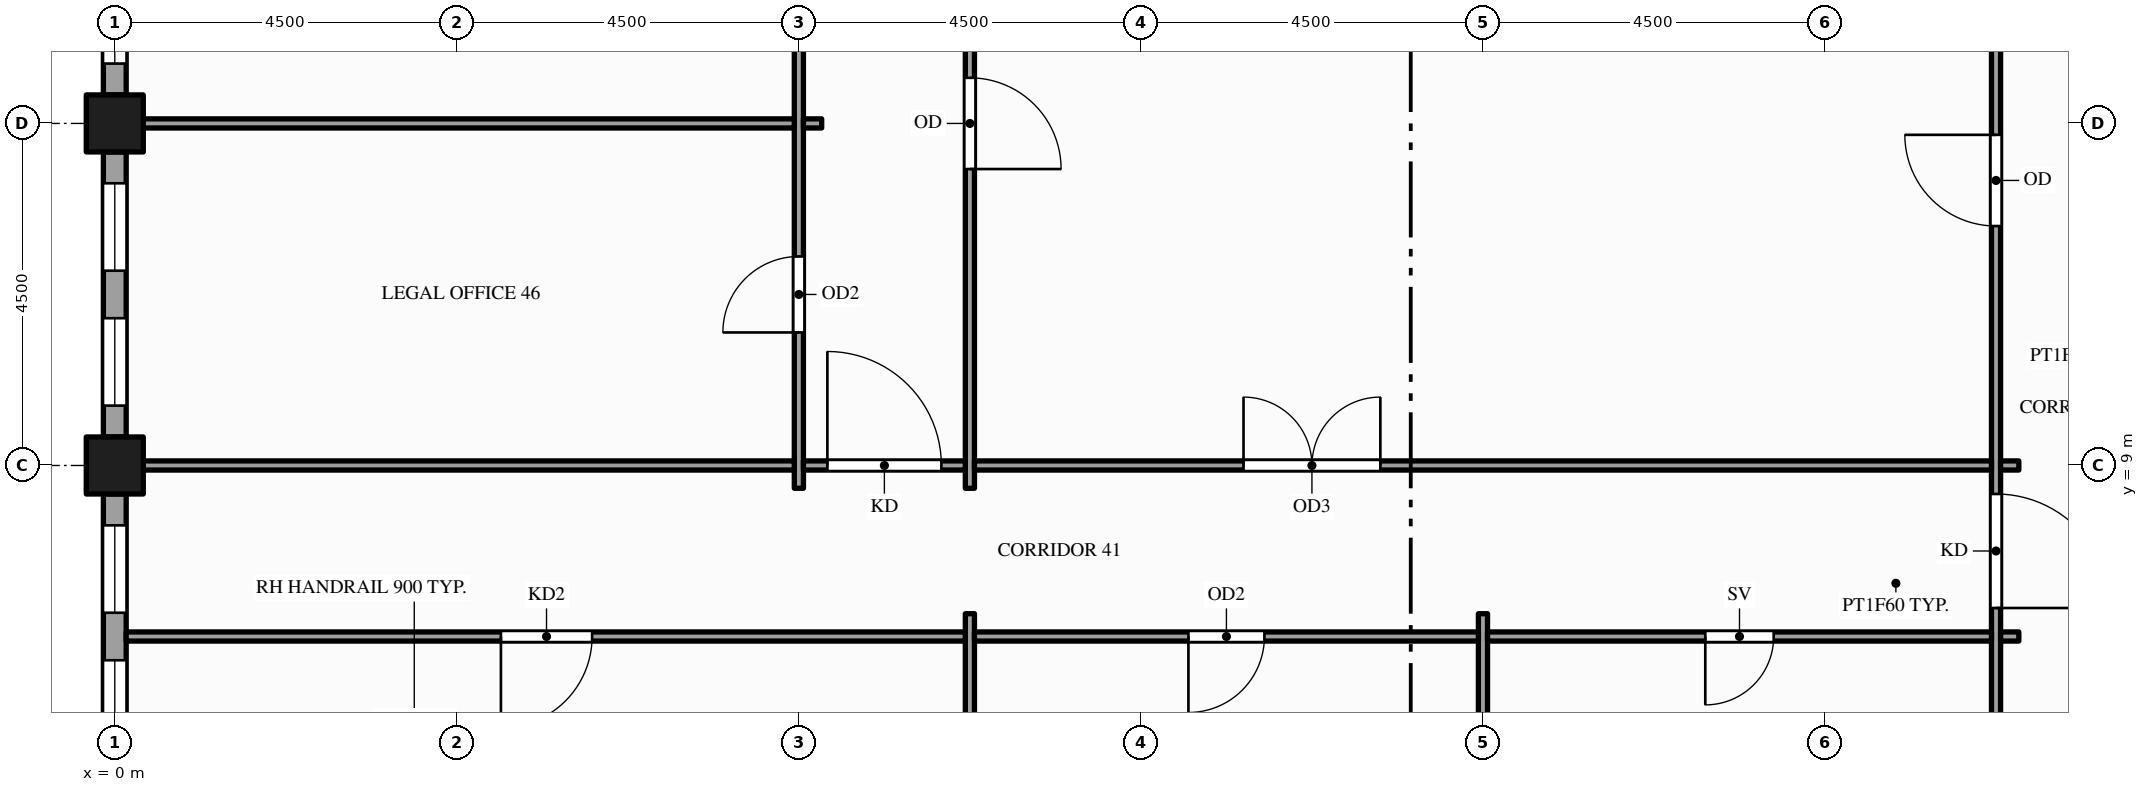
"""IFC4 building model, lengths in metres.
Left out: names, types, materials, properties, quantities, classifications, styles, units other than length and angle.
Written with IfcOpenShell. Run it as: python <this file> out.ifc"""

import sys

from ifc_helpers import new_model, si_unit, direction, frame, frame_2d, origin, origin_2d, place, context, subcontext, project, spatial, rectangle, hollow_rectangle, extrude, element, fill, save


model = new_model("IFC4")
c1 = context("Model", 3, precision=1e-05, world=origin(), true_north=direction((0.0, 1.0)))
c2 = subcontext(c1, "Body", "Model", "MODEL_VIEW")
j1 = project(units=[si_unit("LENGTHUNIT", "METRE"), si_unit("PLANEANGLEUNIT", "RADIAN")], contexts=[c1])
p1 = place(None, origin())
s1 = spatial("IfcSite", under=j1, at=p1, CompositionType="ELEMENT")
p2 = place(p1, origin())
s2 = spatial("IfcBuilding", under=s1, at=p2, CompositionType="ELEMENT")
p3 = place(p2, frame((0.0, 0.0, 215.0)))
s3 = spatial("IfcBuildingStorey", under=s2, at=p3, CompositionType="ELEMENT", Elevation=215.0)
for number, where, z_axis, x_axis in (
    (1, (0.0, 9.0, -0.15), (0.0, 0.0, 1.0), (1.0, 0.0, 0.0)),
    (2, (0.0, 13.5, -0.15), (0.0, 0.0, 1.0), (1.0, 0.0, 0.0)),
):
    element("IfcColumn", number, at=place(p3, frame(where, z_axis=z_axis, x_axis=x_axis)), inside=s3, PredefinedType="COLUMN", context=c2, shape_type="SweptSolid", body=[
        extrude(hollow_rectangle(XDim=0.75, YDim=0.75, WallThickness=0.036, at=origin_2d()), origin(), (0.0, 0.0, 1.0), 4.0),
    ])
p4 = place(p3, frame((0.0, 17.625, 0.0), z_axis=(0.0, 0.0, 1.0), x_axis=(0.0, -1.0, 0.0)))
e3 = element("IfcWall", 3, at=p4, inside=s3, PredefinedType="STANDARD", context=c2, shape_type="SweptSolid", body=[
    extrude(rectangle(XDim=3.75, YDim=0.3, at=frame_2d((1.875, 0.0))), origin(), (0.0, 0.0, 1.0), 3.157),
])
p5 = place(p4, frame((0.413, 0.0, 0.9)))
e4 = element("IfcOpeningElement", 4, at=p5, cuts=e3, PredefinedType="OPENING", context=c2, shape_type="SweptSolid", body=[
    extrude(rectangle(XDim=1.15, YDim=2.0, at=frame_2d((0.575, 1.0))), frame((0.0, 0.16, 0.0), z_axis=(0.0, -1.0, 0.0), x_axis=(1.0, 0.0, 0.0)), (0.0, 0.0, 1.0), 0.32),
])
p6 = place(p4, frame((2.188, 0.0, 0.9)))
e5 = element("IfcOpeningElement", 5, at=p6, cuts=e3, PredefinedType="OPENING", context=c2, shape_type="SweptSolid", body=[
    extrude(rectangle(XDim=1.15, YDim=2.0, at=frame_2d((0.575, 1.0))), frame((0.0, 0.16, 0.0), z_axis=(0.0, -1.0, 0.0), x_axis=(1.0, 0.0, 0.0)), (0.0, 0.0, 1.0), 0.32),
])
p7 = place(p3, frame((0.0, 13.125, 0.0), z_axis=(0.0, 0.0, 1.0), x_axis=(0.0, -1.0, 0.0)))
e6 = element("IfcWall", 6, at=p7, inside=s3, PredefinedType="STANDARD", context=c2, shape_type="SweptSolid", body=[
    extrude(rectangle(XDim=3.75, YDim=0.3, at=frame_2d((1.875, 0.0))), origin(), (0.0, 0.0, 1.0), 3.157),
])
p8 = place(p7, frame((0.413, 0.0, 0.9)))
e7 = element("IfcOpeningElement", 7, at=p8, cuts=e6, PredefinedType="OPENING", context=c2, shape_type="SweptSolid", body=[
    extrude(rectangle(XDim=1.15, YDim=2.0, at=frame_2d((0.575, 1.0))), frame((0.0, 0.16, 0.0), z_axis=(0.0, -1.0, 0.0), x_axis=(1.0, 0.0, 0.0)), (0.0, 0.0, 1.0), 0.32),
])
p9 = place(p7, frame((2.188, 0.0, 0.9)))
e8 = element("IfcOpeningElement", 8, at=p9, cuts=e6, PredefinedType="OPENING", context=c2, shape_type="SweptSolid", body=[
    extrude(rectangle(XDim=1.15, YDim=2.0, at=frame_2d((0.575, 1.0))), frame((0.0, 0.16, 0.0), z_axis=(0.0, -1.0, 0.0), x_axis=(1.0, 0.0, 0.0)), (0.0, 0.0, 1.0), 0.32),
])
p10 = place(p3, frame((0.0, 8.625, 0.0), z_axis=(0.0, 0.0, 1.0), x_axis=(0.0, -1.0, 0.0)))
e9 = element("IfcWall", 9, at=p10, inside=s3, PredefinedType="STANDARD", context=c2, shape_type="SweptSolid", body=[
    extrude(rectangle(XDim=3.75, YDim=0.3, at=frame_2d((1.875, 0.0))), origin(), (0.0, 0.0, 1.0), 3.157),
])
p11 = place(p10, frame((0.413, 0.0, 0.9)))
e10 = element("IfcOpeningElement", 10, at=p11, cuts=e9, PredefinedType="OPENING", context=c2, shape_type="SweptSolid", body=[
    extrude(rectangle(XDim=1.15, YDim=2.0, at=frame_2d((0.575, 1.0))), frame((0.0, 0.16, 0.0), z_axis=(0.0, -1.0, 0.0), x_axis=(1.0, 0.0, 0.0)), (0.0, 0.0, 1.0), 0.32),
])
p12 = place(p10, frame((2.188, 0.0, 0.9)))
e11 = element("IfcOpeningElement", 11, at=p12, cuts=e9, PredefinedType="OPENING", context=c2, shape_type="SweptSolid", body=[
    extrude(rectangle(XDim=1.15, YDim=2.0, at=frame_2d((0.575, 1.0))), frame((0.0, 0.16, 0.0), z_axis=(0.0, -1.0, 0.0), x_axis=(1.0, 0.0, 0.0)), (0.0, 0.0, 1.0), 0.32),
])
p13 = place(p3, frame((9.0, 8.7, 0.0), z_axis=(0.0, 0.0, 1.0), x_axis=(0.0, 1.0, 0.0)))
e12 = element("IfcWall", 12, at=p13, inside=s3, PredefinedType="PARTITIONING", context=c2, shape_type="SweptSolid", body=[
    extrude(rectangle(XDim=23.1, YDim=0.12, at=frame_2d((11.55, 0.0))), origin(), (0.0, 0.0, 1.0), 2.6),
])
p14 = place(p13, frame((2.05, 0.0, 0.0)))
e13 = element("IfcOpeningElement", 13, at=p14, cuts=e12, PredefinedType="OPENING", context=c2, shape_type="SweptSolid", body=[
    extrude(rectangle(XDim=1.0, YDim=2.1, at=frame_2d((0.5, 1.05))), frame((0.0, 0.07, 0.0), z_axis=(0.0, -1.0, 0.0), x_axis=(1.0, 0.0, 0.0)), (0.0, 0.0, 1.0), 0.14),
])
p15 = place(p13, frame((7.675, 0.0, 0.0)))
e14 = element("IfcOpeningElement", 14, at=p15, cuts=e12, PredefinedType="OPENING", context=c2, shape_type="SweptSolid", body=[
    extrude(rectangle(XDim=1.0, YDim=2.1, at=frame_2d((0.5, 1.05))), frame((0.0, 0.07, 0.0), z_axis=(0.0, -1.0, 0.0), x_axis=(1.0, 0.0, 0.0)), (0.0, 0.0, 1.0), 0.14),
])
p16 = place(p13, frame((14.455, 0.0, 0.0)))
e15 = element("IfcOpeningElement", 15, at=p16, cuts=e12, PredefinedType="OPENING", context=c2, shape_type="SweptSolid", body=[
    extrude(rectangle(XDim=1.0, YDim=2.1, at=frame_2d((0.5, 1.05))), frame((0.0, 0.07, 0.0), z_axis=(0.0, -1.0, 0.0), x_axis=(1.0, 0.0, 0.0)), (0.0, 0.0, 1.0), 0.14),
])
p17 = place(p3, frame((11.25, 0.15, 0.0), z_axis=(0.0, 0.0, 1.0), x_axis=(0.0, 1.0, 0.0)))
e16 = element("IfcWall", 16, at=p17, inside=s3, PredefinedType="PARTITIONING", context=c2, shape_type="SweptSolid", body=[
    extrude(rectangle(XDim=6.9, YDim=0.12, at=frame_2d((3.45, 0.0))), origin(), (0.0, 0.0, 1.0), 2.87),
])
p18 = place(p3, frame((11.25, 8.7, 0.0), z_axis=(0.0, 0.0, 1.0), x_axis=(0.0, 1.0, 0.0)))
e17 = element("IfcWall", 17, at=p18, inside=s3, PredefinedType="PARTITIONING", context=c2, shape_type="SweptSolid", body=[
    extrude(rectangle(XDim=23.1, YDim=0.12, at=frame_2d((11.55, 0.0))), origin(), (0.0, 0.0, 1.0), 2.6),
])
p19 = place(p18, frame((18.825, 0.0, 0.0)))
e18 = element("IfcOpeningElement", 18, at=p19, cuts=e17, PredefinedType="OPENING", context=c2, shape_type="SweptSolid", body=[
    extrude(rectangle(XDim=1.2, YDim=2.1, at=frame_2d((0.6, 1.05))), frame((0.0, 0.07, 0.0), z_axis=(0.0, -1.0, 0.0), x_axis=(1.0, 0.0, 0.0)), (0.0, 0.0, 1.0), 0.14),
])
p20 = place(p18, frame((4.2, 0.0, 0.0)))
e19 = element("IfcOpeningElement", 19, at=p20, cuts=e17, PredefinedType="OPENING", context=c2, shape_type="SweptSolid", body=[
    extrude(rectangle(XDim=1.2, YDim=2.1, at=frame_2d((0.6, 1.05))), frame((0.0, 0.07, 0.0), z_axis=(0.0, -1.0, 0.0), x_axis=(1.0, 0.0, 0.0)), (0.0, 0.0, 1.0), 0.14),
])
p21 = place(p3, frame((18.0, 0.15, 0.0), z_axis=(0.0, 0.0, 1.0), x_axis=(0.0, 1.0, 0.0)))
e20 = element("IfcWall", 20, at=p21, inside=s3, PredefinedType="PARTITIONING", context=c2, shape_type="SweptSolid", body=[
    extrude(rectangle(XDim=6.9, YDim=0.12, at=frame_2d((3.45, 0.0))), origin(), (0.0, 0.0, 1.0), 2.87),
])
p22 = place(p3, frame((24.75, -1.35, 0.0), z_axis=(0.0, 0.0, 1.0), x_axis=(0.0, 1.0, 0.0)))
e21 = element("IfcWall", 21, at=p22, inside=s3, PredefinedType="PARTITIONING", context=c2, shape_type="SweptSolid", body=[
    extrude(rectangle(XDim=24.101, YDim=0.12, at=frame_2d((12.05, 0.0))), origin(), (0.0, 0.0, 1.0), 2.76),
])
p23 = place(p22, frame((8.475, 0.0, 0.0)))
e22 = element("IfcOpeningElement", 22, at=p23, cuts=e21, PredefinedType="OPENING", context=c2, shape_type="SweptSolid", body=[
    extrude(rectangle(XDim=1.5, YDim=2.1, at=frame_2d((0.75, 1.05))), frame((0.0, 0.07, 0.0), z_axis=(0.0, -1.0, 0.0), x_axis=(1.0, 0.0, 0.0)), (0.0, 0.0, 1.0), 0.14),
])
p24 = place(p22, frame((13.5, 0.0, 0.0)))
e23 = element("IfcOpeningElement", 23, at=p24, cuts=e21, PredefinedType="OPENING", context=c2, shape_type="SweptSolid", body=[
    extrude(rectangle(XDim=1.2, YDim=2.1, at=frame_2d((0.6, 1.05))), frame((0.0, 0.07, 0.0), z_axis=(0.0, -1.0, 0.0), x_axis=(1.0, 0.0, 0.0)), (0.0, 0.0, 1.0), 0.14),
])
p25 = place(p3, frame((0.15, 6.75, 0.0), z_axis=(0.0, 0.0, 1.0), x_axis=(1.0, 0.0, 0.0)))
e24 = element("IfcWall", 24, at=p25, inside=s3, PredefinedType="PARTITIONING", context=c2, shape_type="SweptSolid", body=[
    extrude(rectangle(XDim=11.04, YDim=0.12, at=frame_2d((5.52, 0.0))), origin(), (0.0, 0.0, 1.0), 2.87),
])
p26 = place(p25, frame((4.93, 0.0, 0.0)))
e25 = element("IfcOpeningElement", 25, at=p26, cuts=e24, PredefinedType="OPENING", context=c2, shape_type="SweptSolid", body=[
    extrude(rectangle(XDim=1.2, YDim=2.1, at=frame_2d((0.6, 1.05))), frame((0.0, 0.07, 0.0), z_axis=(0.0, -1.0, 0.0), x_axis=(1.0, 0.0, 0.0)), (0.0, 0.0, 1.0), 0.14),
])
p27 = place(p3, frame((11.31, 6.75, 0.0), z_axis=(0.0, 0.0, 1.0), x_axis=(1.0, 0.0, 0.0)))
e26 = element("IfcWall", 26, at=p27, inside=s3, PredefinedType="PARTITIONING", context=c2, shape_type="SweptSolid", body=[
    extrude(rectangle(XDim=6.63, YDim=0.12, at=frame_2d((3.315, 0.0))), origin(), (0.0, 0.0, 1.0), 2.87),
])
p28 = place(p27, frame((2.815, 0.0, 0.0)))
e27 = element("IfcOpeningElement", 27, at=p28, cuts=e26, PredefinedType="OPENING", context=c2, shape_type="SweptSolid", body=[
    extrude(rectangle(XDim=1.0, YDim=2.1, at=frame_2d((0.5, 1.05))), frame((0.0, 0.07, 0.0), z_axis=(0.0, -1.0, 0.0), x_axis=(1.0, 0.0, 0.0)), (0.0, 0.0, 1.0), 0.14),
])
p29 = place(p3, frame((18.06, 6.75, 0.0), z_axis=(0.0, 0.0, 1.0), x_axis=(1.0, 0.0, 0.0)))
e28 = element("IfcWall", 28, at=p29, inside=s3, PredefinedType="PARTITIONING", context=c2, shape_type="SweptSolid", body=[
    extrude(rectangle(XDim=6.63, YDim=0.12, at=frame_2d((3.315, 0.0))), origin(), (0.0, 0.0, 1.0), 2.76),
])
p30 = place(p29, frame((2.865, 0.0, 0.0)))
e29 = element("IfcOpeningElement", 29, at=p30, cuts=e28, PredefinedType="OPENING", context=c2, shape_type="SweptSolid", body=[
    extrude(rectangle(XDim=0.9, YDim=2.1, at=frame_2d((0.45, 1.05))), frame((0.0, 0.07, 0.0), z_axis=(0.0, -1.0, 0.0), x_axis=(1.0, 0.0, 0.0)), (0.0, 0.0, 1.0), 0.14),
])
p31 = place(p3, frame((24.81, 6.75, 0.0), z_axis=(0.0, 0.0, 1.0), x_axis=(1.0, 0.0, 0.0)))
e30 = element("IfcWall", 30, at=p31, inside=s3, PredefinedType="PARTITIONING", context=c2, shape_type="SweptSolid", body=[
    extrude(rectangle(XDim=0.24, YDim=0.12, at=frame_2d((0.12, 0.0))), origin(), (0.0, 0.0, 1.0), 2.76),
])
p32 = place(p3, frame((0.15, 9.0, 0.0), z_axis=(0.0, 0.0, 1.0), x_axis=(1.0, 0.0, 0.0)))
e31 = element("IfcWall", 31, at=p32, inside=s3, PredefinedType="PARTITIONING", context=c2, shape_type="SweptSolid", body=[
    extrude(rectangle(XDim=8.79, YDim=0.12, at=frame_2d((4.395, 0.0))), origin(), (0.0, 0.0, 1.0), 2.87),
])
p33 = place(p3, frame((9.06, 9.0, 0.0), z_axis=(0.0, 0.0, 1.0), x_axis=(1.0, 0.0, 0.0)))
e32 = element("IfcWall", 32, at=p33, inside=s3, PredefinedType="PARTITIONING", context=c2, shape_type="SweptSolid", body=[
    extrude(rectangle(XDim=2.13, YDim=0.12, at=frame_2d((1.065, 0.0))), origin(), (0.0, 0.0, 1.0), 2.87),
])
p34 = place(p33, frame((0.315, 0.0, 0.0)))
e33 = element("IfcOpeningElement", 33, at=p34, cuts=e32, PredefinedType="OPENING", context=c2, shape_type="SweptSolid", body=[
    extrude(rectangle(XDim=1.5, YDim=2.1, at=frame_2d((0.75, 1.05))), frame((0.0, 0.07, 0.0), z_axis=(0.0, -1.0, 0.0), x_axis=(1.0, 0.0, 0.0)), (0.0, 0.0, 1.0), 0.14),
])
p35 = place(p3, frame((11.31, 9.0, 0.0), z_axis=(0.0, 0.0, 1.0), x_axis=(1.0, 0.0, 0.0)))
e34 = element("IfcWall", 34, at=p35, inside=s3, PredefinedType="PARTITIONING", context=c2, shape_type="SweptSolid", body=[
    extrude(rectangle(XDim=13.38, YDim=0.12, at=frame_2d((6.69, 0.0))), origin(), (0.0, 0.0, 1.0), 2.76),
])
p36 = place(p35, frame((3.54, 0.0, 0.0)))
e35 = element("IfcOpeningElement", 35, at=p36, cuts=e34, PredefinedType="OPENING", context=c2, shape_type="SweptSolid", body=[
    extrude(rectangle(XDim=1.8, YDim=2.1, at=frame_2d((0.9, 1.05))), frame((0.0, 0.07, 0.0), z_axis=(0.0, -1.0, 0.0), x_axis=(1.0, 0.0, 0.0)), (0.0, 0.0, 1.0), 0.14),
])
p37 = place(p3, frame((24.81, 9.0, 0.0), z_axis=(0.0, 0.0, 1.0), x_axis=(1.0, 0.0, 0.0)))
e36 = element("IfcWall", 36, at=p37, inside=s3, PredefinedType="PARTITIONING", context=c2, shape_type="SweptSolid", body=[
    extrude(rectangle(XDim=0.24, YDim=0.12, at=frame_2d((0.12, 0.0))), origin(), (0.0, 0.0, 1.0), 2.76),
])
p38 = place(p3, frame((0.15, 13.5, 0.0), z_axis=(0.0, 0.0, 1.0), x_axis=(1.0, 0.0, 0.0)))
e37 = element("IfcWall", 37, at=p38, inside=s3, PredefinedType="PARTITIONING", context=c2, shape_type="SweptSolid", body=[
    extrude(rectangle(XDim=8.79, YDim=0.12, at=frame_2d((4.395, 0.0))), origin(), (0.0, 0.0, 1.0), 2.87),
])
p39 = place(p3, frame((9.06, 13.5, 0.0), z_axis=(0.0, 0.0, 1.0), x_axis=(1.0, 0.0, 0.0)))
e38 = element("IfcWall", 38, at=p39, inside=s3, PredefinedType="PARTITIONING", context=c2, shape_type="SweptSolid", body=[
    extrude(rectangle(XDim=0.24, YDim=0.12, at=frame_2d((0.12, 0.0))), origin(), (0.0, 0.0, 1.0), 2.87),
])
p40 = place(p6, origin())
e39 = element("IfcWindow", 39, at=p40, inside=s3, PartitioningType="SINGLE_PANEL", PredefinedType="WINDOW", context=c2, shape_type="SweptSolid", body=[
    extrude(rectangle(XDim=1.15, YDim=2.0, at=frame_2d((0.575, 1.0))), frame((0.0, 0.03, 0.0), z_axis=(0.0, -1.0, 0.0), x_axis=(1.0, 0.0, 0.0)), (0.0, 0.0, 1.0), 0.06),
])
fill(e5, e39)
p41 = place(p8, origin())
e40 = element("IfcWindow", 40, at=p41, inside=s3, PartitioningType="SINGLE_PANEL", PredefinedType="WINDOW", context=c2, shape_type="SweptSolid", body=[
    extrude(rectangle(XDim=1.15, YDim=2.0, at=frame_2d((0.575, 1.0))), frame((0.0, 0.03, 0.0), z_axis=(0.0, -1.0, 0.0), x_axis=(1.0, 0.0, 0.0)), (0.0, 0.0, 1.0), 0.06),
])
fill(e7, e40)
p42 = place(p9, origin())
e41 = element("IfcWindow", 41, at=p42, inside=s3, PartitioningType="SINGLE_PANEL", PredefinedType="WINDOW", context=c2, shape_type="SweptSolid", body=[
    extrude(rectangle(XDim=1.15, YDim=2.0, at=frame_2d((0.575, 1.0))), frame((0.0, 0.03, 0.0), z_axis=(0.0, -1.0, 0.0), x_axis=(1.0, 0.0, 0.0)), (0.0, 0.0, 1.0), 0.06),
])
fill(e8, e41)
p43 = place(p11, origin())
e42 = element("IfcWindow", 42, at=p43, inside=s3, PartitioningType="SINGLE_PANEL", PredefinedType="WINDOW", context=c2, shape_type="SweptSolid", body=[
    extrude(rectangle(XDim=1.15, YDim=2.0, at=frame_2d((0.575, 1.0))), frame((0.0, 0.03, 0.0), z_axis=(0.0, -1.0, 0.0), x_axis=(1.0, 0.0, 0.0)), (0.0, 0.0, 1.0), 0.06),
])
fill(e10, e42)
p44 = place(p12, origin())
e43 = element("IfcWindow", 43, at=p44, inside=s3, PartitioningType="SINGLE_PANEL", PredefinedType="WINDOW", context=c2, shape_type="SweptSolid", body=[
    extrude(rectangle(XDim=1.15, YDim=2.0, at=frame_2d((0.575, 1.0))), frame((0.0, 0.03, 0.0), z_axis=(0.0, -1.0, 0.0), x_axis=(1.0, 0.0, 0.0)), (0.0, 0.0, 1.0), 0.06),
])
fill(e11, e43)
p45 = place(p23, origin())
e44 = element("IfcDoor", 44, at=p45, inside=s3, OperationType="SINGLE_SWING_LEFT", PredefinedType="DOOR", context=c2, shape_type="SweptSolid", body=[
    extrude(rectangle(XDim=1.5, YDim=2.1, at=frame_2d((0.75, 1.05))), frame((0.0, 0.025, 0.0), z_axis=(0.0, -1.0, 0.0), x_axis=(1.0, 0.0, 0.0)), (0.0, 0.0, 1.0), 0.05),
])
fill(e22, e44)
p46 = place(p26, origin())
e45 = element("IfcDoor", 45, at=p46, inside=s3, OperationType="SINGLE_SWING_LEFT", PredefinedType="DOOR", context=c2, shape_type="SweptSolid", body=[
    extrude(rectangle(XDim=1.2, YDim=2.1, at=frame_2d((0.6, 1.05))), frame((0.0, 0.025, 0.0), z_axis=(0.0, -1.0, 0.0), x_axis=(1.0, 0.0, 0.0)), (0.0, 0.0, 1.0), 0.05),
])
fill(e25, e45)
p47 = place(p28, origin())
e46 = element("IfcDoor", 46, at=p47, inside=s3, OperationType="SINGLE_SWING_LEFT", PredefinedType="DOOR", context=c2, shape_type="SweptSolid", body=[
    extrude(rectangle(XDim=1.0, YDim=2.1, at=frame_2d((0.5, 1.05))), frame((0.0, 0.025, 0.0), z_axis=(0.0, -1.0, 0.0), x_axis=(1.0, 0.0, 0.0)), (0.0, 0.0, 1.0), 0.05),
])
fill(e27, e46)
p48 = place(p30, origin())
e47 = element("IfcDoor", 47, at=p48, inside=s3, OperationType="SINGLE_SWING_LEFT", PredefinedType="DOOR", context=c2, shape_type="SweptSolid", body=[
    extrude(rectangle(XDim=0.9, YDim=2.1, at=frame_2d((0.45, 1.05))), frame((0.0, 0.025, 0.0), z_axis=(0.0, -1.0, 0.0), x_axis=(1.0, 0.0, 0.0)), (0.0, 0.0, 1.0), 0.05),
])
fill(e29, e47)
p49 = place(p36, origin())
e48 = element("IfcDoor", 48, at=p49, inside=s3, OperationType="DOUBLE_DOOR_SINGLE_SWING", PredefinedType="DOOR", context=c2, shape_type="SweptSolid", body=[
    extrude(rectangle(XDim=1.8, YDim=2.1, at=frame_2d((0.9, 1.05))), frame((0.0, 0.025, 0.0), z_axis=(0.0, -1.0, 0.0), x_axis=(1.0, 0.0, 0.0)), (0.0, 0.0, 1.0), 0.05),
])
fill(e35, e48)
p50 = place(p34, origin())
e49 = element("IfcDoor", 49, at=p50, inside=s3, OperationType="SINGLE_SWING_LEFT", PredefinedType="DOOR", context=c2, shape_type="SweptSolid", body=[
    extrude(rectangle(XDim=1.5, YDim=2.1, at=frame_2d((0.75, 1.05))), frame((0.0, 0.025, 0.0), z_axis=(0.0, -1.0, 0.0), x_axis=(1.0, 0.0, 0.0)), (0.0, 0.0, 1.0), 0.05),
])
fill(e33, e49)
p51 = place(p14, origin())
e50 = element("IfcDoor", 50, at=p51, inside=s3, OperationType="SINGLE_SWING_LEFT", PredefinedType="DOOR", context=c2, shape_type="SweptSolid", body=[
    extrude(rectangle(XDim=1.0, YDim=2.1, at=frame_2d((0.5, 1.05))), frame((0.0, 0.025, 0.0), z_axis=(0.0, -1.0, 0.0), x_axis=(1.0, 0.0, 0.0)), (0.0, 0.0, 1.0), 0.05),
])
fill(e13, e50)
p52 = place(p20, origin())
e51 = element("IfcDoor", 51, at=p52, inside=s3, OperationType="SINGLE_SWING_LEFT", PredefinedType="DOOR", context=c2, shape_type="SweptSolid", body=[
    extrude(rectangle(XDim=1.2, YDim=2.1, at=frame_2d((0.6, 1.05))), frame((0.0, 0.025, 0.0), z_axis=(0.0, -1.0, 0.0), x_axis=(1.0, 0.0, 0.0)), (0.0, 0.0, 1.0), 0.05),
])
fill(e19, e51)
p53 = place(p24, origin())
e52 = element("IfcDoor", 52, at=p53, inside=s3, OperationType="SINGLE_SWING_RIGHT", PredefinedType="DOOR", context=c2, shape_type="SweptSolid", body=[
    extrude(rectangle(XDim=1.2, YDim=2.1, at=frame_2d((0.6, 1.05))), frame((0.0, 0.025, 0.0), z_axis=(0.0, -1.0, 0.0), x_axis=(1.0, 0.0, 0.0)), (0.0, 0.0, 1.0), 0.05),
])
fill(e23, e52)
save(model, sys.argv[1])
